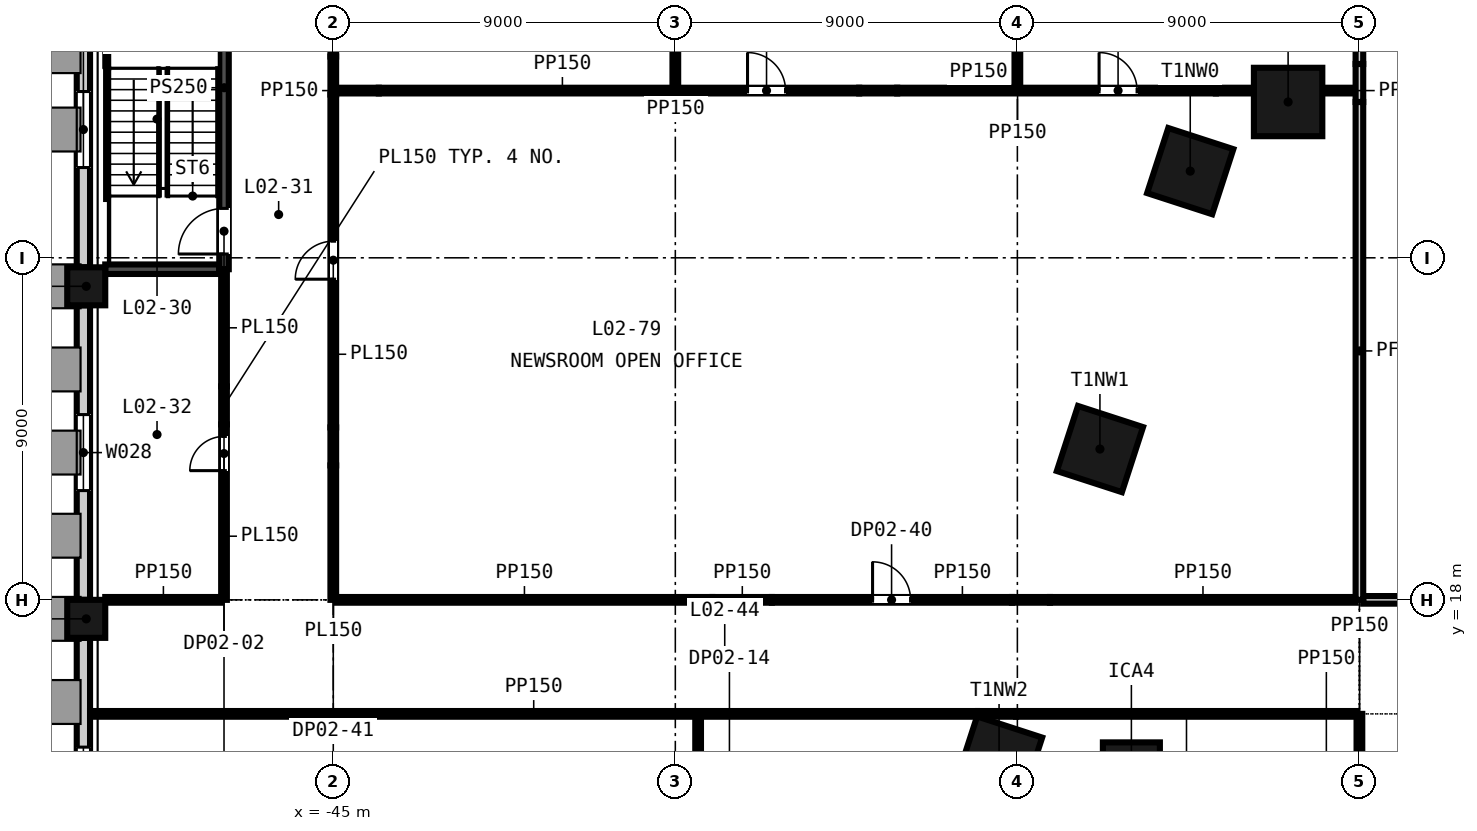
"""IFC4 building model, lengths in metres.
Left out: names, types, materials, properties, quantities, classifications, styles, units other than length and angle.
Written with IfcOpenShell. Run it as: python <this file> out.ifc"""

import sys

from ifc_helpers import new_model, si_unit, direction, frame, frame_2d, origin, origin_2d, place, context, subcontext, project, spatial, rectangle, extrude, element, fill, save


model = new_model("IFC4")
c1 = context("Model", 3, precision=1e-05, world=origin(), true_north=direction((0.0, 1.0)))
c2 = subcontext(c1, "Body", "Model", "MODEL_VIEW")
j1 = project(units=[si_unit("LENGTHUNIT", "METRE"), si_unit("PLANEANGLEUNIT", "RADIAN")], contexts=[c1])
p1 = place(None, origin())
s1 = spatial("IfcSite", under=j1, at=p1, CompositionType="ELEMENT")
p2 = place(p1, origin())
s2 = spatial("IfcBuilding", under=s1, at=p2, CompositionType="ELEMENT")
p3 = place(p2, frame((0.0, 0.0, 18.0)))
s3 = spatial("IfcBuildingStorey", under=s2, at=p3, CompositionType="ELEMENT", Elevation=18.0)
for number, where, z_axis, x_axis in (
    (1, (-19.876, 31.1, -0.4), (0.0, 0.0, 1.0), (-1.0, 0.0, 0.0)),
    (2, (-22.451, 29.281, -0.4), (0.0, 0.0, 1.0), (-0.309, -0.951, 0.0)),
    (3, (-24.827, 21.968, -0.4), (0.0, 0.0, 1.0), (-0.309, -0.951, 0.0)),
    (4, (-27.482, 13.799, -0.4), (0.0, 0.0, 1.0), (-0.309, -0.951, 0.0)),
):
    element("IfcColumn", number, at=place(p3, frame(where, z_axis=z_axis, x_axis=x_axis)), inside=s3, PredefinedType="COLUMN", context=c2, shape_type="SweptSolid", body=[
        extrude(rectangle(XDim=1.8, YDim=1.8, at=origin_2d()), origin(), (0.0, 0.0, 1.0), 4.6),
    ])
p4 = place(p3, frame((-24.0, 13.5, -0.4), z_axis=(0.0, 0.0, 1.0), x_axis=(1.0, 0.0, 0.0)))
e5 = element("IfcColumn", 5, at=p4, inside=s3, PredefinedType="COLUMN", context=c2, shape_type="SweptSolid", body=[
    extrude(rectangle(XDim=1.5, YDim=1.5, at=origin_2d()), origin(), (0.0, 0.0, 1.0), 4.6),
])
for number, where, z_axis, x_axis in (
    (6, (-51.5, 26.25, -0.4), (0.0, 0.0, 1.0), (0.0, -1.0, 0.0)),
    (7, (-51.5, 17.5, -0.4), (0.0, 0.0, 1.0), (0.0, -1.0, 0.0)),
):
    element("IfcColumn", number, at=place(p3, frame(where, z_axis=z_axis, x_axis=x_axis)), inside=s3, PredefinedType="COLUMN", context=c2, shape_type="SweptSolid", body=[
        extrude(rectangle(XDim=1.0, YDim=1.0, at=origin_2d()), origin(), (0.0, 0.0, 1.0), 4.6),
    ])
p5 = place(p3, frame((-51.575, 34.0, -0.4), z_axis=(0.0, 0.0, 1.0), x_axis=(0.0, -1.0, 0.0)))
e8 = element("IfcWall", 8, at=p5, inside=s3, PredefinedType="SOLIDWALL", context=c2, shape_type="SweptSolid", body=[
    extrude(rectangle(XDim=7.25, YDim=0.35, at=frame_2d((3.625, 0.0))), origin(), (0.0, 0.0, 1.0), 3.7),
])
p6 = place(p5, frame((2.625, 0.0, 1.3)))
e9 = element("IfcOpeningElement", 9, at=p6, cuts=e8, PredefinedType="OPENING", context=c2, shape_type="SweptSolid", body=[
    extrude(rectangle(XDim=2.0, YDim=2.35, at=frame_2d((1.0, 1.175))), frame((0.0, 0.185, 0.0), z_axis=(0.0, -1.0, 0.0), x_axis=(1.0, 0.0, 0.0)), (0.0, 0.0, 1.0), 0.37),
])
p7 = place(p3, frame((-51.575, 25.75, -0.4), z_axis=(0.0, 0.0, 1.0), x_axis=(0.0, -1.0, 0.0)))
e10 = element("IfcWall", 10, at=p7, inside=s3, PredefinedType="SOLIDWALL", context=c2, shape_type="SweptSolid", body=[
    extrude(rectangle(XDim=7.75, YDim=0.35, at=frame_2d((3.875, 0.0))), origin(), (0.0, 0.0, 1.0), 3.7),
])
p8 = place(p7, frame((2.875, 0.0, 1.3)))
e11 = element("IfcOpeningElement", 11, at=p8, cuts=e10, PredefinedType="OPENING", context=c2, shape_type="SweptSolid", body=[
    extrude(rectangle(XDim=2.0, YDim=2.35, at=frame_2d((1.0, 1.175))), frame((0.0, 0.185, 0.0), z_axis=(0.0, -1.0, 0.0), x_axis=(1.0, 0.0, 0.0)), (0.0, 0.0, 1.0), 0.37),
])
p9 = place(p3, frame((-51.575, 17.0, -0.4), z_axis=(0.0, 0.0, 1.0), x_axis=(0.0, -1.0, 0.0)))
e12 = element("IfcWall", 12, at=p9, inside=s3, PredefinedType="SOLIDWALL", context=c2, shape_type="SweptSolid", body=[
    extrude(rectangle(XDim=7.75, YDim=0.35, at=frame_2d((3.875, 0.0))), origin(), (0.0, 0.0, 1.0), 3.7),
])
p10 = place(p9, frame((2.875, 0.0, 1.3)))
e13 = element("IfcOpeningElement", 13, at=p10, cuts=e12, PredefinedType="OPENING", context=c2, shape_type="SweptSolid", body=[
    extrude(rectangle(XDim=2.0, YDim=2.35, at=frame_2d((1.0, 1.175))), frame((0.0, 0.185, 0.0), z_axis=(0.0, -1.0, 0.0), x_axis=(1.0, 0.0, 0.0)), (0.0, 0.0, 1.0), 0.37),
])
p11 = place(p3, frame((-51.4, 15.0, 0.0), z_axis=(0.0, 0.0, 1.0), x_axis=(1.0, 0.0, 0.0)))
e14 = element("IfcWall", 14, at=p11, inside=s3, PredefinedType="PARTITIONING", context=c2, shape_type="SweptSolid", body=[
    extrude(rectangle(XDim=23.338, YDim=0.15, at=frame_2d((11.669, 0.0))), origin(), (0.0, 0.0, 1.0), 4.2),
])
p12 = place(p3, frame((-28.035, 15.0, 0.0), z_axis=(0.0, 0.0, 1.0), x_axis=(1.0, 0.0, 0.0)))
e15 = element("IfcWall", 15, at=p12, inside=s3, PredefinedType="PARTITIONING", context=c2, shape_type="SweptSolid", body=[
    extrude(rectangle(XDim=1.0, YDim=0.15, at=frame_2d((0.5, 0.0))), origin(), (0.0, 0.0, 1.0), 3.2),
])
p13 = place(p3, frame((-27.035, 15.0, 0.0), z_axis=(0.0, 0.0, 1.0), x_axis=(1.0, 0.0, 0.0)))
e16 = element("IfcWall", 16, at=p13, inside=s3, PredefinedType="PARTITIONING", context=c2, shape_type="SweptSolid", body=[
    extrude(rectangle(XDim=8.96, YDim=0.15, at=frame_2d((4.48, 0.0))), origin(), (0.0, 0.0, 1.0), 4.2),
])
p14 = place(p3, frame((-51.0, 18.0, 0.0), z_axis=(0.0, 0.0, 1.0), x_axis=(1.0, 0.0, 0.0)))
e17 = element("IfcWall", 17, at=p14, inside=s3, PredefinedType="PARTITIONING", context=c2, shape_type="SweptSolid", body=[
    extrude(rectangle(XDim=3.05, YDim=0.15, at=frame_2d((1.525, 0.0))), origin(), (0.0, 0.0, 1.0), 4.2),
])
p15 = place(p3, frame((-44.925, 18.0, 0.0), z_axis=(0.0, 0.0, 1.0), x_axis=(1.0, 0.0, 0.0)))
e18 = element("IfcWall", 18, at=p15, inside=s3, PredefinedType="PARTITIONING", context=c2, shape_type="SweptSolid", body=[
    extrude(rectangle(XDim=9.9, YDim=0.15, at=frame_2d((4.95, 0.0))), origin(), (0.0, 0.0, 1.0), 4.2),
])
p16 = place(p3, frame((-35.025, 18.0, 0.0), z_axis=(0.0, 0.0, 1.0), x_axis=(1.0, 0.0, 0.0)))
e19 = element("IfcWall", 19, at=p16, inside=s3, PredefinedType="PARTITIONING", context=c2, shape_type="SweptSolid", body=[
    extrude(rectangle(XDim=1.565, YDim=0.15, at=frame_2d((0.783, 0.0))), origin(), (0.0, 0.0, 1.0), 3.111),
])
p17 = place(p3, frame((-33.46, 18.0, 0.0), z_axis=(0.0, 0.0, 1.0), x_axis=(1.0, 0.0, 0.0)))
e20 = element("IfcWall", 20, at=p17, inside=s3, PredefinedType="PARTITIONING", context=c2, shape_type="SweptSolid", body=[
    extrude(rectangle(XDim=6.318, YDim=0.15, at=frame_2d((3.159, 0.0))), origin(), (0.0, 0.0, 1.0), 4.2),
])
p18 = place(p17, frame((2.65, 0.0, 0.0)))
e21 = element("IfcOpeningElement", 21, at=p18, cuts=e20, PredefinedType="OPENING", context=c2, shape_type="SweptSolid", body=[
    extrude(rectangle(XDim=1.0, YDim=2.1, at=frame_2d((0.5, 1.05))), frame((0.0, 0.085, 0.0), z_axis=(0.0, -1.0, 0.0), x_axis=(1.0, 0.0, 0.0)), (0.0, 0.0, 1.0), 0.17),
])
p19 = place(p3, frame((-27.142, 18.0, 0.0), z_axis=(0.0, 0.0, 1.0), x_axis=(1.0, 0.0, 0.0)))
e22 = element("IfcWall", 22, at=p19, inside=s3, PredefinedType="PARTITIONING", context=c2, shape_type="SweptSolid", body=[
    extrude(rectangle(XDim=1.0, YDim=0.15, at=frame_2d((0.5, 0.0))), origin(), (0.0, 0.0, 1.0), 3.2),
])
p20 = place(p3, frame((-26.142, 18.0, 0.0), z_axis=(0.0, 0.0, 1.0), x_axis=(1.0, 0.0, 0.0)))
e23 = element("IfcWall", 23, at=p20, inside=s3, PredefinedType="PARTITIONING", context=c2, shape_type="SweptSolid", body=[
    extrude(rectangle(XDim=8.042, YDim=0.15, at=frame_2d((4.021, 0.0))), origin(), (0.0, 0.0, 1.0), 4.2),
])
p21 = place(p3, frame((-17.9, 18.0, 0.0), z_axis=(0.0, 0.0, 1.0), x_axis=(1.0, 0.0, 0.0)))
e24 = element("IfcWall", 24, at=p21, inside=s3, PredefinedType="PARTITIONING", context=c2, shape_type="SweptSolid", body=[
    extrude(rectangle(XDim=7.8, YDim=0.2, at=frame_2d((3.9, 0.0))), origin(), (0.0, 0.0, 1.0), 4.2),
])
p22 = place(p21, frame((2.9, 0.0, 0.0)))
e25 = element("IfcOpeningElement", 25, at=p22, cuts=e24, PredefinedType="OPENING", context=c2, shape_type="SweptSolid", body=[
    extrude(rectangle(XDim=1.8, YDim=2.4, at=frame_2d((0.9, 1.2))), frame((0.0, 0.11, 0.0), z_axis=(0.0, -1.0, 0.0), x_axis=(1.0, 0.0, 0.0)), (0.0, 0.0, 1.0), 0.22),
])
p23 = place(p3, frame((-51.0, 26.7, 0.0), z_axis=(0.0, 0.0, 1.0), x_axis=(1.0, 0.0, 0.0)))
e26 = element("IfcWall", 26, at=p23, inside=s3, PredefinedType="SHEAR", context=c2, shape_type="SweptSolid", body=[
    extrude(rectangle(XDim=3.0, YDim=0.25, at=frame_2d((1.5, 0.0))), origin(), (0.0, 0.0, 1.0), 4.2),
])
p24 = place(p3, frame((-44.925, 31.4, 0.0), z_axis=(0.0, 0.0, 1.0), x_axis=(1.0, 0.0, 0.0)))
e27 = element("IfcWall", 27, at=p24, inside=s3, PredefinedType="PARTITIONING", context=c2, shape_type="SweptSolid", body=[
    extrude(rectangle(XDim=1.123, YDim=0.15, at=frame_2d((0.562, 0.0))), origin(), (0.0, 0.0, 1.0), 3.111),
])
p25 = place(p3, frame((-43.802, 31.4, 0.0), z_axis=(0.0, 0.0, 1.0), x_axis=(1.0, 0.0, 0.0)))
e28 = element("IfcWall", 28, at=p25, inside=s3, PredefinedType="PARTITIONING", context=c2, shape_type="SweptSolid", body=[
    extrude(rectangle(XDim=12.64, YDim=0.15, at=frame_2d((6.32, 0.0))), origin(), (0.0, 0.0, 1.0), 4.2),
])
p26 = place(p25, frame((9.702, 0.0, 0.0)))
e29 = element("IfcOpeningElement", 29, at=p26, cuts=e28, PredefinedType="OPENING", context=c2, shape_type="SweptSolid", body=[
    extrude(rectangle(XDim=1.0, YDim=2.1, at=frame_2d((0.5, 1.05))), frame((0.0, 0.085, 0.0), z_axis=(0.0, -1.0, 0.0), x_axis=(1.0, 0.0, 0.0)), (0.0, 0.0, 1.0), 0.17),
])
p27 = place(p3, frame((-31.162, 31.4, 0.0), z_axis=(0.0, 0.0, 1.0), x_axis=(1.0, 0.0, 0.0)))
e30 = element("IfcWall", 30, at=p27, inside=s3, PredefinedType="PARTITIONING", context=c2, shape_type="SweptSolid", body=[
    extrude(rectangle(XDim=1.0, YDim=0.15, at=frame_2d((0.5, 0.0))), origin(), (0.0, 0.0, 1.0), 3.219),
])
p28 = place(p3, frame((-30.162, 31.4, 0.0), z_axis=(0.0, 0.0, 1.0), x_axis=(1.0, 0.0, 0.0)))
e31 = element("IfcWall", 31, at=p28, inside=s3, PredefinedType="PARTITIONING", context=c2, shape_type="SweptSolid", body=[
    extrude(rectangle(XDim=8.386, YDim=0.15, at=frame_2d((4.193, 0.0))), origin(), (0.0, 0.0, 1.0), 4.2),
])
p29 = place(p28, frame((5.312, 0.0, 0.0)))
e32 = element("IfcOpeningElement", 32, at=p29, cuts=e31, PredefinedType="OPENING", context=c2, shape_type="SweptSolid", body=[
    extrude(rectangle(XDim=1.0, YDim=2.1, at=frame_2d((0.5, 1.05))), frame((0.0, 0.085, 0.0), z_axis=(0.0, -1.0, 0.0), x_axis=(1.0, 0.0, 0.0)), (0.0, 0.0, 1.0), 0.17),
])
p30 = place(p3, frame((-21.776, 31.4, 0.0), z_axis=(0.0, 0.0, 1.0), x_axis=(1.0, 0.0, 0.0)))
e33 = element("IfcWall", 33, at=p30, inside=s3, PredefinedType="PARTITIONING", context=c2, shape_type="SweptSolid", body=[
    extrude(rectangle(XDim=1.0, YDim=0.15, at=frame_2d((0.5, 0.0))), origin(), (0.0, 0.0, 1.0), 3.2),
])
p31 = place(p3, frame((-18.976, 31.4, 0.0), z_axis=(0.0, 0.0, 1.0), x_axis=(1.0, 0.0, 0.0)))
e34 = element("IfcWall", 34, at=p31, inside=s3, PredefinedType="PARTITIONING", context=c2, shape_type="SweptSolid", body=[
    extrude(rectangle(XDim=0.876, YDim=0.15, at=frame_2d((0.438, 0.0))), origin(), (0.0, 0.0, 1.0), 3.2),
])
p32 = place(p3, frame((-47.875, 18.0, 0.0), z_axis=(0.0, 0.0, 1.0), x_axis=(0.0, 1.0, 0.0)))
e35 = element("IfcWall", 35, at=p32, inside=s3, PredefinedType="PARTITIONING", context=c2, shape_type="SweptSolid", body=[
    extrude(rectangle(XDim=4.616, YDim=0.15, at=frame_2d((2.308, 0.0))), origin(), (0.0, 0.0, 1.0), 4.2),
])
p33 = place(p32, frame((3.4, 0.0, 0.0)))
e36 = element("IfcOpeningElement", 36, at=p33, cuts=e35, PredefinedType="OPENING", context=c2, shape_type="SweptSolid", body=[
    extrude(rectangle(XDim=0.9, YDim=2.1, at=frame_2d((0.45, 1.05))), frame((0.0, 0.085, 0.0), z_axis=(0.0, -1.0, 0.0), x_axis=(1.0, 0.0, 0.0)), (0.0, 0.0, 1.0), 0.17),
])
p34 = place(p3, frame((-47.875, 22.616, 0.0), z_axis=(0.0, 0.0, 1.0), x_axis=(0.0, 1.0, 0.0)))
e37 = element("IfcWall", 37, at=p34, inside=s3, PredefinedType="PARTITIONING", context=c2, shape_type="SweptSolid", body=[
    extrude(rectangle(XDim=1.0, YDim=0.15, at=frame_2d((0.5, 0.0))), origin(), (0.0, 0.0, 1.0), 3.111),
])
p35 = place(p3, frame((-47.875, 23.616, 0.0), z_axis=(0.0, 0.0, 1.0), x_axis=(0.0, 1.0, 0.0)))
e38 = element("IfcWall", 38, at=p35, inside=s3, PredefinedType="PARTITIONING", context=c2, shape_type="SweptSolid", body=[
    extrude(rectangle(XDim=3.084, YDim=0.15, at=frame_2d((1.542, 0.0))), origin(), (0.0, 0.0, 1.0), 4.2),
])
p36 = place(p3, frame((-47.875, 26.7, 0.0), z_axis=(0.0, 0.0, 1.0), x_axis=(0.0, 1.0, 0.0)))
e39 = element("IfcWall", 39, at=p36, inside=s3, PredefinedType="SHEAR", context=c2, shape_type="SweptSolid", body=[
    extrude(rectangle(XDim=7.9, YDim=0.25, at=frame_2d((3.95, 0.0))), origin(), (0.0, 0.0, 1.0), 4.2),
])
p37 = place(p36, frame((0.4, 0.0, 0.0)))
e40 = element("IfcOpeningElement", 40, at=p37, cuts=e39, PredefinedType="OPENING", context=c2, shape_type="SweptSolid", body=[
    extrude(rectangle(XDim=1.2, YDim=2.1, at=frame_2d((0.6, 1.05))), frame((0.0, 0.135, 0.0), z_axis=(0.0, -1.0, 0.0), x_axis=(1.0, 0.0, 0.0)), (0.0, 0.0, 1.0), 0.27),
])
p38 = place(p3, frame((-45.0, 18.0, 0.0), z_axis=(0.0, 0.0, 1.0), x_axis=(0.0, 1.0, 0.0)))
e41 = element("IfcWall", 41, at=p38, inside=s3, PredefinedType="PARTITIONING", context=c2, shape_type="SweptSolid", body=[
    extrude(rectangle(XDim=3.537, YDim=0.15, at=frame_2d((1.769, 0.0))), origin(), (0.0, 0.0, 1.0), 4.2),
])
p39 = place(p3, frame((-45.0, 21.537, 0.0), z_axis=(0.0, 0.0, 1.0), x_axis=(0.0, 1.0, 0.0)))
e42 = element("IfcWall", 42, at=p39, inside=s3, PredefinedType="PARTITIONING", context=c2, shape_type="SweptSolid", body=[
    extrude(rectangle(XDim=1.0, YDim=0.15, at=frame_2d((0.5, 0.0))), origin(), (0.0, 0.0, 1.0), 3.111),
])
p40 = place(p3, frame((-45.0, 22.537, 0.0), z_axis=(0.0, 0.0, 1.0), x_axis=(0.0, 1.0, 0.0)))
e43 = element("IfcWall", 43, at=p40, inside=s3, PredefinedType="PARTITIONING", context=c2, shape_type="SweptSolid", body=[
    extrude(rectangle(XDim=8.758, YDim=0.15, at=frame_2d((4.379, 0.0))), origin(), (0.0, 0.0, 1.0), 4.2),
])
p41 = place(p40, frame((3.9, 0.0, 0.0)))
e44 = element("IfcOpeningElement", 44, at=p41, cuts=e43, PredefinedType="OPENING", context=c2, shape_type="SweptSolid", body=[
    extrude(rectangle(XDim=1.0, YDim=2.1, at=frame_2d((0.5, 1.05))), frame((0.0, 0.085, 0.0), z_axis=(0.0, -1.0, 0.0), x_axis=(1.0, 0.0, 0.0)), (0.0, 0.0, 1.0), 0.17),
])
p42 = place(p3, frame((-45.0, 31.295, 0.0), z_axis=(0.0, 0.0, 1.0), x_axis=(0.0, 1.0, 0.0)))
e45 = element("IfcWall", 45, at=p42, inside=s3, PredefinedType="PARTITIONING", context=c2, shape_type="SweptSolid", body=[
    extrude(rectangle(XDim=1.0, YDim=0.15, at=frame_2d((0.5, 0.0))), origin(), (0.0, 0.0, 1.0), 3.111),
])
p43 = place(p3, frame((-45.0, 32.295, 0.0), z_axis=(0.0, 0.0, 1.0), x_axis=(0.0, 1.0, 0.0)))
e46 = element("IfcWall", 46, at=p43, inside=s3, PredefinedType="PARTITIONING", context=c2, shape_type="SweptSolid", body=[
    extrude(rectangle(XDim=7.705, YDim=0.15, at=frame_2d((3.852, 0.0))), origin(), (0.0, 0.0, 1.0), 4.2),
])
p44 = place(p43, frame((3.4, 0.0, 0.0)))
e47 = element("IfcOpeningElement", 47, at=p44, cuts=e46, PredefinedType="OPENING", context=c2, shape_type="SweptSolid", body=[
    extrude(rectangle(XDim=1.0, YDim=2.1, at=frame_2d((0.5, 1.05))), frame((0.0, 0.085, 0.0), z_axis=(0.0, -1.0, 0.0), x_axis=(1.0, 0.0, 0.0)), (0.0, 0.0, 1.0), 0.17),
])
p45 = place(p3, frame((-36.0, 31.475, 0.0), z_axis=(0.0, 0.0, 1.0), x_axis=(0.0, 1.0, 0.0)))
e48 = element("IfcWall", 48, at=p45, inside=s3, PredefinedType="PARTITIONING", context=c2, shape_type="SweptSolid", body=[
    extrude(rectangle(XDim=4.089, YDim=0.15, at=frame_2d((2.044, 0.0))), origin(), (0.0, 0.0, 1.0), 4.2),
])
p46 = place(p3, frame((-35.4, 1.326, 0.0), z_axis=(0.0, 0.0, 1.0), x_axis=(0.0, 1.0, 0.0)))
e49 = element("IfcWall", 49, at=p46, inside=s3, PredefinedType="PARTITIONING", context=c2, shape_type="SweptSolid", body=[
    extrude(rectangle(XDim=13.599, YDim=0.15, at=frame_2d((6.8, 0.0))), origin(), (0.0, 0.0, 1.0), 4.2),
])
p47 = place(p3, frame((-27.0, 31.475, 0.0), z_axis=(0.0, 0.0, 1.0), x_axis=(0.0, 1.0, 0.0)))
e50 = element("IfcWall", 50, at=p47, inside=s3, PredefinedType="PARTITIONING", context=c2, shape_type="SweptSolid", body=[
    extrude(rectangle(XDim=6.083, YDim=0.15, at=frame_2d((3.042, 0.0))), origin(), (0.0, 0.0, 1.0), 4.2),
])
p48 = place(p3, frame((-18.0, 1.251, 0.0), z_axis=(0.0, 0.0, 1.0), x_axis=(0.0, 1.0, 0.0)))
e51 = element("IfcWall", 51, at=p48, inside=s3, PredefinedType="PARTITIONING", context=c2, shape_type="SweptSolid", body=[
    extrude(rectangle(XDim=13.749, YDim=0.15, at=frame_2d((6.875, 0.0))), origin(), (0.0, 0.0, 1.0), 4.2),
])
p49 = place(p3, frame((-18.0, 18.0, 0.0), z_axis=(0.0, 0.0, 1.0), x_axis=(0.0, 1.0, 0.0)))
e52 = element("IfcWall", 52, at=p49, inside=s3, PredefinedType="PARTITIONING", context=c2, shape_type="SweptSolid", body=[
    extrude(rectangle(XDim=13.1, YDim=0.2, at=frame_2d((6.55, 0.0))), origin(), (0.0, 0.0, 1.0), 4.2),
])
p50 = place(p3, frame((-18.0, 31.1, 0.0), z_axis=(0.0, 0.0, 1.0), x_axis=(0.0, 1.0, 0.0)))
e53 = element("IfcWall", 53, at=p50, inside=s3, PredefinedType="PARTITIONING", context=c2, shape_type="SweptSolid", body=[
    extrude(rectangle(XDim=1.0, YDim=0.2, at=frame_2d((0.5, 0.0))), origin(), (0.0, 0.0, 1.0), 3.2),
])
p51 = place(p3, frame((-18.0, 32.1, 0.0), z_axis=(0.0, 0.0, 1.0), x_axis=(0.0, 1.0, 0.0)))
e54 = element("IfcWall", 54, at=p51, inside=s3, PredefinedType="PARTITIONING", context=c2, shape_type="SweptSolid", body=[
    extrude(rectangle(XDim=4.4, YDim=0.2, at=frame_2d((2.2, 0.0))), origin(), (0.0, 0.0, 1.0), 4.2),
])
p52 = place(p6, origin())
e55 = element("IfcWindow", 55, at=p52, inside=s3, PartitioningType="SINGLE_PANEL", PredefinedType="WINDOW", context=c2, shape_type="SweptSolid", body=[
    extrude(rectangle(XDim=2.0, YDim=2.35, at=frame_2d((1.0, 1.175))), frame((0.0, 0.03, 0.0), z_axis=(0.0, -1.0, 0.0), x_axis=(1.0, 0.0, 0.0)), (0.0, 0.0, 1.0), 0.06),
])
fill(e9, e55)
p53 = place(p8, origin())
e56 = element("IfcWindow", 56, at=p53, inside=s3, PartitioningType="SINGLE_PANEL", PredefinedType="WINDOW", context=c2, shape_type="SweptSolid", body=[
    extrude(rectangle(XDim=2.0, YDim=2.35, at=frame_2d((1.0, 1.175))), frame((0.0, 0.03, 0.0), z_axis=(0.0, -1.0, 0.0), x_axis=(1.0, 0.0, 0.0)), (0.0, 0.0, 1.0), 0.06),
])
fill(e11, e56)
p54 = place(p10, origin())
e57 = element("IfcWindow", 57, at=p54, inside=s3, PartitioningType="SINGLE_PANEL", PredefinedType="WINDOW", context=c2, shape_type="SweptSolid", body=[
    extrude(rectangle(XDim=2.0, YDim=2.35, at=frame_2d((1.0, 1.175))), frame((0.0, 0.03, 0.0), z_axis=(0.0, -1.0, 0.0), x_axis=(1.0, 0.0, 0.0)), (0.0, 0.0, 1.0), 0.06),
])
fill(e13, e57)
p55 = place(p37, origin())
e58 = element("IfcDoor", 58, at=p55, inside=s3, OperationType="SINGLE_SWING_LEFT", PredefinedType="DOOR", context=c2, shape_type="SweptSolid", body=[
    extrude(rectangle(XDim=1.2, YDim=2.1, at=frame_2d((0.6, 1.05))), frame((0.0, 0.025, 0.0), z_axis=(0.0, -1.0, 0.0), x_axis=(1.0, 0.0, 0.0)), (0.0, 0.0, 1.0), 0.05),
])
fill(e40, e58)
p56 = place(p33, origin())
e59 = element("IfcDoor", 59, at=p56, inside=s3, OperationType="SINGLE_SWING_LEFT", PredefinedType="DOOR", context=c2, shape_type="SweptSolid", body=[
    extrude(rectangle(XDim=0.9, YDim=2.1, at=frame_2d((0.45, 1.05))), frame((0.0, 0.025, 0.0), z_axis=(0.0, -1.0, 0.0), x_axis=(1.0, 0.0, 0.0)), (0.0, 0.0, 1.0), 0.05),
])
fill(e36, e59)
p57 = place(p18, origin())
e60 = element("IfcDoor", 60, at=p57, inside=s3, OperationType="SINGLE_SWING_LEFT", PredefinedType="DOOR", context=c2, shape_type="SweptSolid", body=[
    extrude(rectangle(XDim=1.0, YDim=2.1, at=frame_2d((0.5, 1.05))), frame((0.0, 0.025, 0.0), z_axis=(0.0, -1.0, 0.0), x_axis=(1.0, 0.0, 0.0)), (0.0, 0.0, 1.0), 0.05),
])
fill(e21, e60)
p58 = place(p41, origin())
e61 = element("IfcDoor", 61, at=p58, inside=s3, OperationType="SINGLE_SWING_LEFT", PredefinedType="DOOR", context=c2, shape_type="SweptSolid", body=[
    extrude(rectangle(XDim=1.0, YDim=2.1, at=frame_2d((0.5, 1.05))), frame((0.0, 0.025, 0.0), z_axis=(0.0, -1.0, 0.0), x_axis=(1.0, 0.0, 0.0)), (0.0, 0.0, 1.0), 0.05),
])
fill(e44, e61)
p59 = place(p26, origin())
e62 = element("IfcDoor", 62, at=p59, inside=s3, OperationType="SINGLE_SWING_LEFT", PredefinedType="DOOR", context=c2, shape_type="SweptSolid", body=[
    extrude(rectangle(XDim=1.0, YDim=2.1, at=frame_2d((0.5, 1.05))), frame((0.0, 0.025, 0.0), z_axis=(0.0, -1.0, 0.0), x_axis=(1.0, 0.0, 0.0)), (0.0, 0.0, 1.0), 0.05),
])
fill(e29, e62)
p60 = place(p29, origin())
e63 = element("IfcDoor", 63, at=p60, inside=s3, OperationType="SINGLE_SWING_LEFT", PredefinedType="DOOR", context=c2, shape_type="SweptSolid", body=[
    extrude(rectangle(XDim=1.0, YDim=2.1, at=frame_2d((0.5, 1.05))), frame((0.0, 0.025, 0.0), z_axis=(0.0, -1.0, 0.0), x_axis=(1.0, 0.0, 0.0)), (0.0, 0.0, 1.0), 0.05),
])
fill(e32, e63)
save(model, sys.argv[1])
